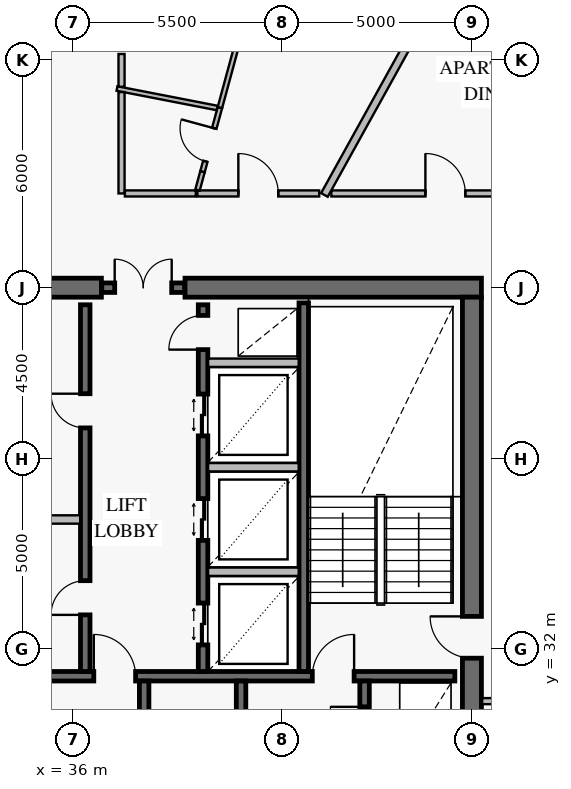
"""IFC4 building model, lengths in metres.
Left out: names, types, materials, properties, quantities, classifications, styles, units other than length and angle.
Written with IfcOpenShell. Run it as: python <this file> out.ifc"""

import sys

from ifc_helpers import new_model, si_unit, direction, frame, frame_2d, origin, place, context, subcontext, project, spatial, rectangle, extrude, element, fill, save


model = new_model("IFC4")
c1 = context("Model", 3, precision=1e-05, world=origin(), true_north=direction((0.0, 1.0)))
c2 = subcontext(c1, "Body", "Model", "MODEL_VIEW")
j1 = project(units=[si_unit("LENGTHUNIT", "METRE"), si_unit("PLANEANGLEUNIT", "RADIAN")], contexts=[c1])
p1 = place(None, origin())
s1 = spatial("IfcSite", under=j1, at=p1, CompositionType="ELEMENT")
p2 = place(p1, origin())
s2 = spatial("IfcBuilding", under=s1, at=p2, CompositionType="ELEMENT")
p3 = place(p2, frame((0.0, 0.0, 331.0)))
s3 = spatial("IfcBuildingStorey", under=s2, at=p3, CompositionType="ELEMENT", Elevation=331.0)
p4 = place(p3, frame((46.75, 41.5, 0.0), z_axis=(0.0, 0.0, 1.0), x_axis=(-1.0, 0.0, 0.0)))
e1 = element("IfcWall", 1, at=p4, inside=s3, PredefinedType="SHEAR", context=c2, shape_type="SweptSolid", body=[
    extrude(rectangle(XDim=7.8, YDim=0.5, at=frame_2d((3.9, 0.0))), origin(), (0.0, 0.0, 1.0), 3.8),
])
p5 = place(p3, frame((36.75, 41.5, 0.0), z_axis=(0.0, 0.0, 1.0), x_axis=(-1.0, 0.0, 0.0)))
e2 = element("IfcWall", 2, at=p5, inside=s3, PredefinedType="SHEAR", context=c2, shape_type="SweptSolid", body=[
    extrude(rectangle(XDim=11.5, YDim=0.5, at=frame_2d((5.75, 0.0))), origin(), (0.0, 0.0, 1.0), 3.8),
])
p6 = place(p5, frame((4.25, 0.0, 0.0)))
e3 = element("IfcOpeningElement", 3, at=p6, cuts=e2, PredefinedType="OPENING", context=c2, shape_type="SweptSolid", body=[
    extrude(rectangle(XDim=1.1, YDim=2.15, at=frame_2d((0.55, 1.075))), frame((0.0, 0.262, 0.0), z_axis=(0.0, -1.0, 0.0), x_axis=(1.0, 0.0, 0.0)), (0.0, 0.0, 1.0), 0.524),
])
p7 = place(p3, frame((46.5, 22.75, 0.0), z_axis=(0.0, 0.0, 1.0), x_axis=(0.0, 1.0, 0.0)))
e4 = element("IfcWall", 4, at=p7, inside=s3, PredefinedType="SHEAR", context=c2, shape_type="SweptSolid", body=[
    extrude(rectangle(XDim=18.5, YDim=0.5, at=frame_2d((9.25, 0.0))), origin(), (0.0, 0.0, 1.0), 3.8),
])
p8 = place(p7, frame((9.0, 0.0, 0.0)))
e5 = element("IfcOpeningElement", 5, at=p8, cuts=e4, PredefinedType="OPENING", context=c2, shape_type="SweptSolid", body=[
    extrude(rectangle(XDim=1.1, YDim=2.15, at=frame_2d((0.55, 1.075))), frame((0.0, 0.262, 0.0), z_axis=(0.0, -1.0, 0.0), x_axis=(1.0, 0.0, 0.0)), (0.0, 0.0, 1.0), 0.524),
])
p9 = place(p3, frame((36.76, 41.5, 0.0), z_axis=(0.0, 0.0, 1.0), x_axis=(1.0, 0.0, 0.0)))
e6 = element("IfcWall", 6, at=p9, inside=s3, PredefinedType="SOLIDWALL", context=c2, shape_type="SweptSolid", body=[
    extrude(rectangle(XDim=2.18, YDim=0.25, at=frame_2d((1.09, 0.0))), origin(), (0.0, 0.0, 1.0), 3.8),
])
p10 = place(p9, frame((0.34, 0.0, 0.0)))
e7 = element("IfcOpeningElement", 7, at=p10, cuts=e6, PredefinedType="OPENING", context=c2, shape_type="SweptSolid", body=[
    extrude(rectangle(XDim=1.5, YDim=2.15, at=frame_2d((0.75, 1.075))), frame((0.0, 0.137, 0.0), z_axis=(0.0, -1.0, 0.0), x_axis=(1.0, 0.0, 0.0)), (0.0, 0.0, 1.0), 0.274),
])
p11 = place(p3, frame((25.95, 31.275, 0.0), z_axis=(0.0, 0.0, 1.0), x_axis=(1.0, 0.0, 0.0)))
e8 = element("IfcWall", 8, at=p11, inside=s3, PredefinedType="SOLIDWALL", context=c2, shape_type="SweptSolid", body=[
    extrude(rectangle(XDim=20.1, YDim=0.25, at=frame_2d((10.05, 0.0))), origin(), (0.0, 0.0, 1.0), 3.8),
])
p12 = place(p11, frame((2.6, 0.0, 0.0)))
e9 = element("IfcOpeningElement", 9, at=p12, cuts=e8, PredefinedType="OPENING", context=c2, shape_type="SweptSolid", body=[
    extrude(rectangle(XDim=1.1, YDim=2.15, at=frame_2d((0.55, 1.075))), frame((0.0, 0.137, 0.0), z_axis=(0.0, -1.0, 0.0), x_axis=(1.0, 0.0, 0.0)), (0.0, 0.0, 1.0), 0.274),
])
p13 = place(p11, frame((10.6, 0.0, 0.0)))
e10 = element("IfcOpeningElement", 10, at=p13, cuts=e8, PredefinedType="OPENING", context=c2, shape_type="SweptSolid", body=[
    extrude(rectangle(XDim=1.1, YDim=2.15, at=frame_2d((0.55, 1.075))), frame((0.0, 0.137, 0.0), z_axis=(0.0, -1.0, 0.0), x_axis=(1.0, 0.0, 0.0)), (0.0, 0.0, 1.0), 0.274),
])
p14 = place(p11, frame((16.35, 0.0, 0.0)))
e11 = element("IfcOpeningElement", 11, at=p14, cuts=e8, PredefinedType="OPENING", context=c2, shape_type="SweptSolid", body=[
    extrude(rectangle(XDim=1.1, YDim=2.15, at=frame_2d((0.55, 1.075))), frame((0.0, 0.137, 0.0), z_axis=(0.0, -1.0, 0.0), x_axis=(1.0, 0.0, 0.0)), (0.0, 0.0, 1.0), 0.274),
])
p15 = place(p3, frame((42.075, 31.4, 0.0), z_axis=(0.0, 0.0, 1.0), x_axis=(0.0, 1.0, 0.0)))
e12 = element("IfcWall", 12, at=p15, inside=s3, PredefinedType="SOLIDWALL", context=c2, shape_type="SweptSolid", body=[
    extrude(rectangle(XDim=9.7, YDim=0.25, at=frame_2d((4.85, 0.0))), origin(), (0.0, 0.0, 1.0), 3.8),
])
p16 = place(p3, frame((36.325, 31.4, 0.0), z_axis=(0.0, 0.0, 1.0), x_axis=(0.0, 1.0, 0.0)))
e13 = element("IfcWall", 13, at=p16, inside=s3, PredefinedType="SOLIDWALL", context=c2, shape_type="SweptSolid", body=[
    extrude(rectangle(XDim=9.65, YDim=0.25, at=frame_2d((4.825, 0.0))), origin(), (0.0, 0.0, 1.0), 3.8),
])
p17 = place(p16, frame((1.49, 0.0, 0.0)))
e14 = element("IfcOpeningElement", 14, at=p17, cuts=e13, PredefinedType="OPENING", context=c2, shape_type="SweptSolid", body=[
    extrude(rectangle(XDim=0.9, YDim=2.1, at=frame_2d((0.45, 1.05))), frame((0.0, 0.137, 0.0), z_axis=(0.0, -1.0, 0.0), x_axis=(1.0, 0.0, 0.0)), (0.0, 0.0, 1.0), 0.274),
])
p18 = place(p16, frame((6.41, 0.0, 0.0)))
e15 = element("IfcOpeningElement", 15, at=p18, cuts=e13, PredefinedType="OPENING", context=c2, shape_type="SweptSolid", body=[
    extrude(rectangle(XDim=0.9, YDim=2.1, at=frame_2d((0.45, 1.05))), frame((0.0, 0.137, 0.0), z_axis=(0.0, -1.0, 0.0), x_axis=(1.0, 0.0, 0.0)), (0.0, 0.0, 1.0), 0.274),
])
p19 = place(p3, frame((39.425, 31.4, 0.0), z_axis=(0.0, 0.0, 1.0), x_axis=(0.0, 1.0, 0.0)))
e16 = element("IfcWall", 16, at=p19, inside=s3, PredefinedType="SOLIDWALL", context=c2, shape_type="SweptSolid", body=[
    extrude(rectangle(XDim=9.65, YDim=0.25, at=frame_2d((4.825, 0.0))), origin(), (0.0, 0.0, 1.0), 3.8),
])
p20 = place(p19, frame((0.7, 0.0, 0.0)))
e17 = element("IfcOpeningElement", 17, at=p20, cuts=e16, PredefinedType="OPENING", context=c2, shape_type="SweptSolid", body=[
    extrude(rectangle(XDim=1.1, YDim=2.2, at=frame_2d((0.55, 1.1))), frame((0.0, 0.137, 0.0), z_axis=(0.0, -1.0, 0.0), x_axis=(1.0, 0.0, 0.0)), (0.0, 0.0, 1.0), 0.274),
])
p21 = place(p19, frame((3.45, 0.0, 0.0)))
e18 = element("IfcOpeningElement", 18, at=p21, cuts=e16, PredefinedType="OPENING", context=c2, shape_type="SweptSolid", body=[
    extrude(rectangle(XDim=1.1, YDim=2.2, at=frame_2d((0.55, 1.1))), frame((0.0, 0.137, 0.0), z_axis=(0.0, -1.0, 0.0), x_axis=(1.0, 0.0, 0.0)), (0.0, 0.0, 1.0), 0.274),
])
p22 = place(p19, frame((6.2, 0.0, 0.0)))
e19 = element("IfcOpeningElement", 19, at=p22, cuts=e16, PredefinedType="OPENING", context=c2, shape_type="SweptSolid", body=[
    extrude(rectangle(XDim=1.1, YDim=2.2, at=frame_2d((0.55, 1.1))), frame((0.0, 0.137, 0.0), z_axis=(0.0, -1.0, 0.0), x_axis=(1.0, 0.0, 0.0)), (0.0, 0.0, 1.0), 0.274),
])
p23 = place(p19, frame((8.47, 0.0, 0.0)))
e20 = element("IfcOpeningElement", 20, at=p23, cuts=e16, PredefinedType="OPENING", context=c2, shape_type="SweptSolid", body=[
    extrude(rectangle(XDim=0.9, YDim=2.1, at=frame_2d((0.45, 1.05))), frame((0.0, 0.137, 0.0), z_axis=(0.0, -1.0, 0.0), x_axis=(1.0, 0.0, 0.0)), (0.0, 0.0, 1.0), 0.274),
])
p24 = place(p3, frame((37.875, 22.95, 0.0), z_axis=(0.0, 0.0, 1.0), x_axis=(0.0, 1.0, 0.0)))
e21 = element("IfcWall", 21, at=p24, inside=s3, PredefinedType="SOLIDWALL", context=c2, shape_type="SweptSolid", body=[
    extrude(rectangle(XDim=8.2, YDim=0.25, at=frame_2d((4.1, 0.0))), origin(), (0.0, 0.0, 1.0), 3.8),
])
p25 = place(p24, frame((1.312, 0.0, 0.0)))
e22 = element("IfcOpeningElement", 22, at=p25, cuts=e21, PredefinedType="OPENING", context=c2, shape_type="SweptSolid", body=[
    extrude(rectangle(XDim=0.9, YDim=2.1, at=frame_2d((0.45, 1.05))), frame((0.0, 0.137, 0.0), z_axis=(0.0, -1.0, 0.0), x_axis=(1.0, 0.0, 0.0)), (0.0, 0.0, 1.0), 0.274),
])
p26 = place(p24, frame((5.512, 0.0, 0.0)))
e23 = element("IfcOpeningElement", 23, at=p26, cuts=e21, PredefinedType="OPENING", context=c2, shape_type="SweptSolid", body=[
    extrude(rectangle(XDim=0.9, YDim=2.1, at=frame_2d((0.45, 1.05))), frame((0.0, 0.137, 0.0), z_axis=(0.0, -1.0, 0.0), x_axis=(1.0, 0.0, 0.0)), (0.0, 0.0, 1.0), 0.274),
])
p27 = place(p3, frame((40.425, 22.95, 0.0), z_axis=(0.0, 0.0, 1.0), x_axis=(0.0, 1.0, 0.0)))
e24 = element("IfcWall", 24, at=p27, inside=s3, PredefinedType="SOLIDWALL", context=c2, shape_type="SweptSolid", body=[
    extrude(rectangle(XDim=8.2, YDim=0.25, at=frame_2d((4.1, 0.0))), origin(), (0.0, 0.0, 1.0), 3.8),
])
p28 = place(p3, frame((43.675, 22.95, 0.0), z_axis=(0.0, 0.0, 1.0), x_axis=(0.0, 1.0, 0.0)))
e25 = element("IfcWall", 25, at=p28, inside=s3, PredefinedType="SOLIDWALL", context=c2, shape_type="SweptSolid", body=[
    extrude(rectangle(XDim=8.2, YDim=0.25, at=frame_2d((4.1, 0.0))), origin(), (0.0, 0.0, 1.0), 3.8),
])
p29 = place(p28, frame((0.75, 0.0, 0.0)))
e26 = element("IfcOpeningElement", 26, at=p29, cuts=e25, PredefinedType="OPENING", context=c2, shape_type="SweptSolid", body=[
    extrude(rectangle(XDim=1.3, YDim=2.3, at=frame_2d((0.65, 1.15))), frame((0.0, 0.137, 0.0), z_axis=(0.0, -1.0, 0.0), x_axis=(1.0, 0.0, 0.0)), (0.0, 0.0, 1.0), 0.274),
])
p30 = place(p28, frame((3.7, 0.0, 0.0)))
e27 = element("IfcOpeningElement", 27, at=p30, cuts=e25, PredefinedType="OPENING", context=c2, shape_type="SweptSolid", body=[
    extrude(rectangle(XDim=1.3, YDim=2.3, at=frame_2d((0.65, 1.15))), frame((0.0, 0.137, 0.0), z_axis=(0.0, -1.0, 0.0), x_axis=(1.0, 0.0, 0.0)), (0.0, 0.0, 1.0), 0.274),
])
p31 = place(p28, frame((6.62, 0.0, 0.0)))
e28 = element("IfcOpeningElement", 28, at=p31, cuts=e25, PredefinedType="OPENING", context=c2, shape_type="SweptSolid", body=[
    extrude(rectangle(XDim=0.9, YDim=2.1, at=frame_2d((0.45, 1.05))), frame((0.0, 0.137, 0.0), z_axis=(0.0, -1.0, 0.0), x_axis=(1.0, 0.0, 0.0)), (0.0, 0.0, 1.0), 0.274),
])
p32 = place(p3, frame((46.77, 30.62, 0.0), z_axis=(0.0, 0.0, 1.0), x_axis=(1.0, 0.0, 0.0)))
e29 = element("IfcWall", 29, at=p32, inside=s3, PredefinedType="PARTITIONING", context=c2, shape_type="SweptSolid", body=[
    extrude(rectangle(XDim=2.029, YDim=0.16, at=frame_2d((1.015, 0.0))), origin(), (0.0, 0.0, 1.0), 3.55),
])
p33 = place(p32, frame((0.49, 0.0, 0.0)))
e30 = element("IfcOpeningElement", 30, at=p33, cuts=e29, PredefinedType="OPENING", context=c2, shape_type="SweptSolid", body=[
    extrude(rectangle(XDim=1.05, YDim=2.15, at=frame_2d((0.525, 1.075))), frame((0.0, 0.092, 0.0), z_axis=(0.0, -1.0, 0.0), x_axis=(1.0, 0.0, 0.0)), (0.0, 0.0, 1.0), 0.184),
])
p34 = place(p3, frame((48.8, 43.98, 0.0), z_axis=(0.0, 0.0, 1.0), x_axis=(-1.0, 0.0, 0.0)))
e31 = element("IfcWall", 31, at=p34, inside=s3, PredefinedType="PARTITIONING", context=c2, shape_type="SweptSolid", body=[
    extrude(rectangle(XDim=5.999, YDim=0.16, at=frame_2d((3.0, 0.0))), origin(), (0.0, 0.0, 1.0), 3.0),
])
p35 = place(p34, frame((2.475, 0.0, 0.0)))
e32 = element("IfcOpeningElement", 32, at=p35, cuts=e31, PredefinedType="OPENING", context=c2, shape_type="SweptSolid", body=[
    extrude(rectangle(XDim=1.05, YDim=2.15, at=frame_2d((0.525, 1.075))), frame((0.0, 0.092, 0.0), z_axis=(0.0, -1.0, 0.0), x_axis=(1.0, 0.0, 0.0)), (0.0, 0.0, 1.0), 0.184),
])
p36 = place(p3, frame((39.41, 44.55, 0.0), z_axis=(0.0, 0.0, 1.0), x_axis=(0.262173284377, 0.965020812708, 0.0)))
e33 = element("IfcWall", 33, at=p36, inside=s3, PredefinedType="PARTITIONING", context=c2, shape_type="SweptSolid", body=[
    extrude(rectangle(XDim=1.751, YDim=0.12, at=frame_2d((0.875, 0.0))), origin(), (0.0, 0.0, 1.0), 3.0),
])
p37 = place(p36, frame((0.285, 0.0, 0.0)))
e34 = element("IfcOpeningElement", 34, at=p37, cuts=e33, PredefinedType="OPENING", context=c2, shape_type="SweptSolid", body=[
    extrude(rectangle(XDim=0.9, YDim=2.1, at=frame_2d((0.45, 1.05))), frame((0.0, 0.072, 0.0), z_axis=(0.0, -1.0, 0.0), x_axis=(1.0, 0.0, 0.0)), (0.0, 0.0, 1.0), 0.144),
])
p38 = place(p3, frame((39.869, 46.24, 0.0), z_axis=(0.0, 0.0, 1.0), x_axis=(0.262173652668, 0.965020712652, 0.0)))
e35 = element("IfcWall", 35, at=p38, inside=s3, PredefinedType="PARTITIONING", context=c2, shape_type="SweptSolid", body=[
    extrude(rectangle(XDim=7.137, YDim=0.12, at=frame_2d((3.568, 0.0))), origin(), (0.0, 0.0, 1.0), 3.0),
])
p39 = place(p38, frame((3.068, 0.0, 0.0)))
e36 = element("IfcOpeningElement", 36, at=p39, cuts=e35, PredefinedType="OPENING", context=c2, shape_type="SweptSolid", body=[
    extrude(rectangle(XDim=0.95, YDim=2.1, at=frame_2d((0.475, 1.05))), frame((0.0, 0.072, 0.0), z_axis=(0.0, -1.0, 0.0), x_axis=(1.0, 0.0, 0.0)), (0.0, 0.0, 1.0), 0.144),
])
p40 = place(p3, frame((42.482, 43.98, 0.0), z_axis=(0.0, 0.0, 1.0), x_axis=(-1.0, 0.0, 0.0)))
e37 = element("IfcWall", 37, at=p40, inside=s3, PredefinedType="PARTITIONING", context=c2, shape_type="SweptSolid", body=[
    extrude(rectangle(XDim=3.206, YDim=0.16, at=frame_2d((1.603, 0.0))), origin(), (0.0, 0.0, 1.0), 3.55),
])
p41 = place(p40, frame((1.078, 0.0, 0.0)))
e38 = element("IfcOpeningElement", 38, at=p41, cuts=e37, PredefinedType="OPENING", context=c2, shape_type="SweptSolid", body=[
    extrude(rectangle(XDim=1.05, YDim=2.15, at=frame_2d((0.525, 1.075))), frame((0.0, 0.092, 0.0), z_axis=(0.0, -1.0, 0.0), x_axis=(1.0, 0.0, 0.0)), (0.0, 0.0, 1.0), 0.184),
])
p42 = place(p3, frame((34.108, 35.4, 0.0), z_axis=(0.0, 0.0, 1.0), x_axis=(1.0, 0.0, 0.0)))
e39 = element("IfcWall", 39, at=p42, inside=s3, PredefinedType="PARTITIONING", context=c2, shape_type="SweptSolid", body=[
    extrude(rectangle(XDim=2.084, YDim=0.22, at=frame_2d((1.042, 0.0))), origin(), (0.0, 0.0, 1.0), 3.55),
])
for number, where, z_axis, x_axis in (
    (40, (39.558, 34.025, 0.0), (0.0, 0.0, 1.0), (1.0, 0.0, 0.0)),
    (41, (39.558, 36.775, 0.0), (0.0, 0.0, 1.0), (1.0, 0.0, 0.0)),
    (42, (39.558, 39.525, 0.0), (0.0, 0.0, 1.0), (1.0, 0.0, 0.0)),
):
    element("IfcWall", number, at=place(p3, frame(where, z_axis=z_axis, x_axis=x_axis)), inside=s3, PredefinedType="PARTITIONING", context=c2, shape_type="SweptSolid", body=[
        extrude(rectangle(XDim=2.384, YDim=0.22, at=frame_2d((1.192, 0.0))), origin(), (0.0, 0.0, 1.0), 3.55),
    ])
p43 = place(p3, frame((42.618, 43.94, 0.0), z_axis=(0.0, 0.0, 1.0), x_axis=(0.484817892783, 0.874615121546, 0.0)))
e43 = element("IfcWall", 43, at=p43, inside=s3, PredefinedType="PARTITIONING", context=c2, shape_type="SweptSolid", body=[
    extrude(rectangle(XDim=13.671, YDim=0.2, at=frame_2d((6.836, 0.0))), origin(), (0.0, 0.0, 1.0), 2.97),
])
p44 = place(p3, frame((39.279, 44.068, 0.0), z_axis=(0.0, 0.0, 1.0), x_axis=(0.262496924618, 0.964932829044, 0.0)))
e44 = element("IfcWall", 44, at=p44, inside=s3, PredefinedType="PARTITIONING", context=c2, shape_type="SweptSolid", body=[
    extrude(rectangle(XDim=0.5, YDim=0.12, at=frame_2d((0.25, 0.0))), origin(), (0.0, 0.0, 1.0), 3.0),
])
p45 = place(p3, frame((39.795, 46.229, 0.0), z_axis=(0.0, 0.0, 1.0), x_axis=(-0.981632896255, 0.190779603181, 0.0)))
e45 = element("IfcWall", 45, at=p45, inside=s3, PredefinedType="PARTITIONING", context=c2, shape_type="SweptSolid", body=[
    extrude(rectangle(XDim=2.685, YDim=0.12, at=frame_2d((1.342, 0.0))), origin(), (0.0, 0.0, 1.0), 3.0),
])
p46 = place(p3, frame((37.28, 43.98, 0.0), z_axis=(0.0, 0.0, 1.0), x_axis=(0.0, 1.0, 0.0)))
e46 = element("IfcWall", 46, at=p46, inside=s3, PredefinedType="PARTITIONING", context=c2, shape_type="SweptSolid", body=[
    extrude(rectangle(XDim=2.668, YDim=0.16, at=frame_2d((1.334, 0.0))), origin(), (0.0, 0.0, 1.0), 3.55),
])
p47 = place(p3, frame((39.234, 43.98, 0.0), z_axis=(0.0, 0.0, 1.0), x_axis=(-1.0, 0.0, 0.0)))
e47 = element("IfcWall", 47, at=p47, inside=s3, PredefinedType="PARTITIONING", context=c2, shape_type="SweptSolid", body=[
    extrude(rectangle(XDim=1.866, YDim=0.16, at=frame_2d((0.933, 0.0))), origin(), (0.0, 0.0, 1.0), 3.0),
])
p48 = place(p3, frame((37.28, 46.787, 0.0), z_axis=(0.0, 0.0, 1.0), x_axis=(0.0, 1.0, 0.0)))
e48 = element("IfcWall", 48, at=p48, inside=s3, PredefinedType="PARTITIONING", context=c2, shape_type="SweptSolid", body=[
    extrude(rectangle(XDim=0.863, YDim=0.16, at=frame_2d((0.432, 0.0))), origin(), (0.0, 0.0, 1.0), 3.55),
])
p49 = place(p8, origin())
e49 = element("IfcDoor", 49, at=p49, inside=s3, OperationType="SINGLE_SWING_RIGHT", PredefinedType="USERDEFINED", context=c2, shape_type="SweptSolid", body=[
    extrude(rectangle(XDim=1.1, YDim=2.15, at=frame_2d((0.55, 1.075))), frame((0.0, 0.025, 0.0), z_axis=(0.0, -1.0, 0.0), x_axis=(1.0, 0.0, 0.0)), (0.0, 0.0, 1.0), 0.05),
])
fill(e5, e49)
p50 = place(p10, origin())
e50 = element("IfcDoor", 50, at=p50, inside=s3, OperationType="DOUBLE_DOOR_SINGLE_SWING", PredefinedType="DOOR", context=c2, shape_type="SweptSolid", body=[
    extrude(rectangle(XDim=1.5, YDim=2.15, at=frame_2d((0.75, 1.075))), frame((0.0, 0.025, 0.0), z_axis=(0.0, -1.0, 0.0), x_axis=(1.0, 0.0, 0.0)), (0.0, 0.0, 1.0), 0.05),
])
fill(e7, e50)
p51 = place(p13, origin())
e51 = element("IfcDoor", 51, at=p51, inside=s3, OperationType="SINGLE_SWING_LEFT", PredefinedType="USERDEFINED", context=c2, shape_type="SweptSolid", body=[
    extrude(rectangle(XDim=1.1, YDim=2.15, at=frame_2d((0.55, 1.075))), frame((0.0, 0.025, 0.0), z_axis=(0.0, -1.0, 0.0), x_axis=(1.0, 0.0, 0.0)), (0.0, 0.0, 1.0), 0.05),
])
fill(e10, e51)
p52 = place(p14, origin())
e52 = element("IfcDoor", 52, at=p52, inside=s3, OperationType="SINGLE_SWING_RIGHT", PredefinedType="USERDEFINED", context=c2, shape_type="SweptSolid", body=[
    extrude(rectangle(XDim=1.1, YDim=2.15, at=frame_2d((0.55, 1.075))), frame((0.0, 0.025, 0.0), z_axis=(0.0, -1.0, 0.0), x_axis=(1.0, 0.0, 0.0)), (0.0, 0.0, 1.0), 0.05),
])
fill(e11, e52)
p53 = place(p17, origin())
e53 = element("IfcDoor", 53, at=p53, inside=s3, OperationType="SINGLE_SWING_LEFT", PredefinedType="DOOR", context=c2, shape_type="SweptSolid", body=[
    extrude(rectangle(XDim=0.9, YDim=2.1, at=frame_2d((0.45, 1.05))), frame((0.0, 0.025, 0.0), z_axis=(0.0, -1.0, 0.0), x_axis=(1.0, 0.0, 0.0)), (0.0, 0.0, 1.0), 0.05),
])
fill(e14, e53)
p54 = place(p18, origin())
e54 = element("IfcDoor", 54, at=p54, inside=s3, OperationType="SINGLE_SWING_RIGHT", PredefinedType="DOOR", context=c2, shape_type="SweptSolid", body=[
    extrude(rectangle(XDim=0.9, YDim=2.1, at=frame_2d((0.45, 1.05))), frame((0.0, 0.025, 0.0), z_axis=(0.0, -1.0, 0.0), x_axis=(1.0, 0.0, 0.0)), (0.0, 0.0, 1.0), 0.05),
])
fill(e15, e54)
p55 = place(p20, origin())
e55 = element("IfcDoor", 55, at=p55, inside=s3, OperationType="DOUBLE_DOOR_SLIDING", PredefinedType="DOOR", context=c2, shape_type="SweptSolid", body=[
    extrude(rectangle(XDim=1.1, YDim=2.2, at=frame_2d((0.55, 1.1))), frame((0.0, 0.025, 0.0), z_axis=(0.0, -1.0, 0.0), x_axis=(1.0, 0.0, 0.0)), (0.0, 0.0, 1.0), 0.05),
])
fill(e17, e55)
p56 = place(p21, origin())
e56 = element("IfcDoor", 56, at=p56, inside=s3, OperationType="DOUBLE_DOOR_SLIDING", PredefinedType="DOOR", context=c2, shape_type="SweptSolid", body=[
    extrude(rectangle(XDim=1.1, YDim=2.2, at=frame_2d((0.55, 1.1))), frame((0.0, 0.025, 0.0), z_axis=(0.0, -1.0, 0.0), x_axis=(1.0, 0.0, 0.0)), (0.0, 0.0, 1.0), 0.05),
])
fill(e18, e56)
p57 = place(p22, origin())
e57 = element("IfcDoor", 57, at=p57, inside=s3, OperationType="DOUBLE_DOOR_SLIDING", PredefinedType="DOOR", context=c2, shape_type="SweptSolid", body=[
    extrude(rectangle(XDim=1.1, YDim=2.2, at=frame_2d((0.55, 1.1))), frame((0.0, 0.025, 0.0), z_axis=(0.0, -1.0, 0.0), x_axis=(1.0, 0.0, 0.0)), (0.0, 0.0, 1.0), 0.05),
])
fill(e19, e57)
p58 = place(p23, origin())
e58 = element("IfcDoor", 58, at=p58, inside=s3, OperationType="SINGLE_SWING_LEFT", PredefinedType="DOOR", context=c2, shape_type="SweptSolid", body=[
    extrude(rectangle(XDim=0.9, YDim=2.1, at=frame_2d((0.45, 1.05))), frame((0.0, 0.025, 0.0), z_axis=(0.0, -1.0, 0.0), x_axis=(1.0, 0.0, 0.0)), (0.0, 0.0, 1.0), 0.05),
])
fill(e20, e58)
p59 = place(p31, origin())
e59 = element("IfcDoor", 59, at=p59, inside=s3, OperationType="SINGLE_SWING_RIGHT", PredefinedType="DOOR", context=c2, shape_type="SweptSolid", body=[
    extrude(rectangle(XDim=0.9, YDim=2.1, at=frame_2d((0.45, 1.05))), frame((0.0, 0.025, 0.0), z_axis=(0.0, -1.0, 0.0), x_axis=(1.0, 0.0, 0.0)), (0.0, 0.0, 1.0), 0.05),
])
fill(e28, e59)
p60 = place(p35, frame((1.05, 0.0, 0.0), z_axis=(0.0, 0.0, 1.0), x_axis=(-1.0, 0.0, 0.0)))
e60 = element("IfcDoor", 60, at=p60, inside=s3, OperationType="SINGLE_SWING_LEFT", PredefinedType="DOOR", context=c2, shape_type="SweptSolid", body=[
    extrude(rectangle(XDim=1.05, YDim=2.15, at=frame_2d((0.525, 1.075))), frame((0.0, 0.025, 0.0), z_axis=(0.0, -1.0, 0.0), x_axis=(1.0, 0.0, 0.0)), (0.0, 0.0, 1.0), 0.05),
])
fill(e32, e60)
p61 = place(p37, origin())
e61 = element("IfcDoor", 61, at=p61, inside=s3, OperationType="SINGLE_SWING_RIGHT", PredefinedType="DOOR", context=c2, shape_type="SweptSolid", body=[
    extrude(rectangle(XDim=0.9, YDim=2.1, at=frame_2d((0.45, 1.05))), frame((0.0, 0.025, 0.0), z_axis=(0.0, -1.0, 0.0), x_axis=(1.0, 0.0, 0.0)), (0.0, 0.0, 1.0), 0.05),
])
fill(e34, e61)
p62 = place(p41, frame((1.05, 0.0, 0.0), z_axis=(0.0, 0.0, 1.0), x_axis=(-1.0, 0.0, 0.0)))
e62 = element("IfcDoor", 62, at=p62, inside=s3, OperationType="SINGLE_SWING_LEFT", PredefinedType="DOOR", context=c2, shape_type="SweptSolid", body=[
    extrude(rectangle(XDim=1.05, YDim=2.15, at=frame_2d((0.525, 1.075))), frame((0.0, 0.025, 0.0), z_axis=(0.0, -1.0, 0.0), x_axis=(1.0, 0.0, 0.0)), (0.0, 0.0, 1.0), 0.05),
])
fill(e38, e62)
save(model, sys.argv[1])
